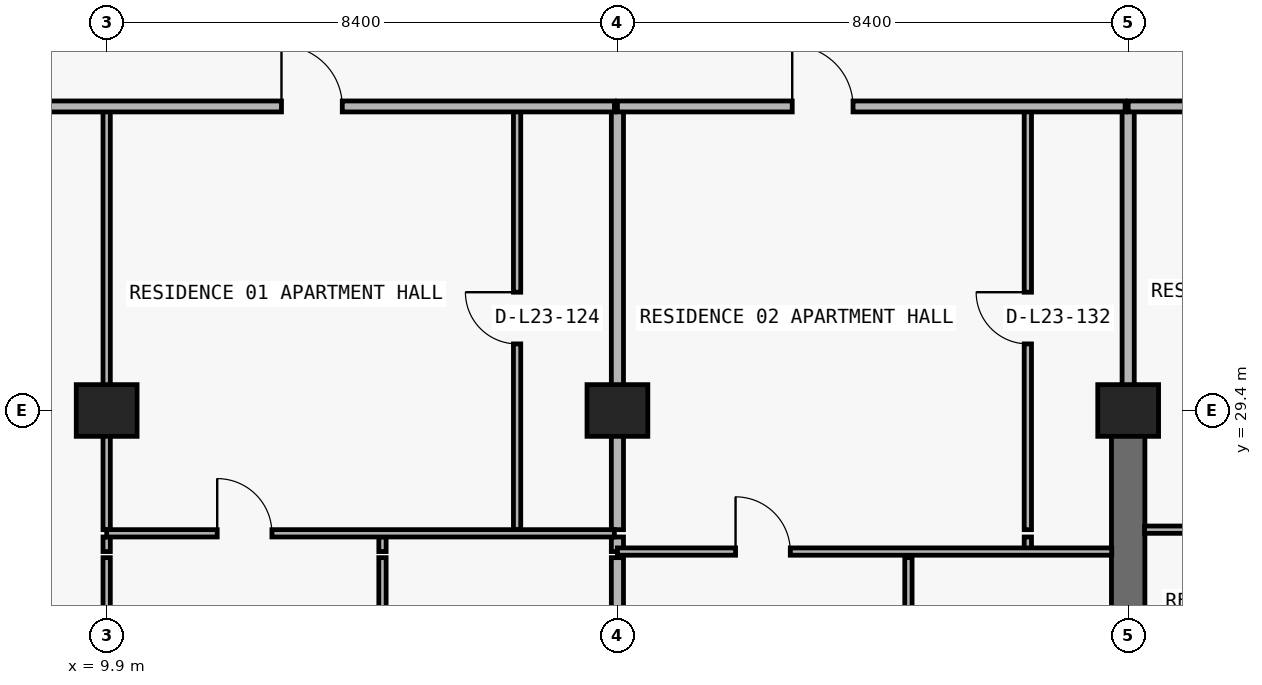
"""IFC4 building model, lengths in metres.
Left out: names, types, materials, properties, quantities, classifications, styles, units other than length and angle.
Written with IfcOpenShell. Run it as: python <this file> out.ifc"""

import sys

from ifc_helpers import new_model, si_unit, direction, frame, frame_2d, origin, origin_2d, place, context, subcontext, project, spatial, rectangle, extrude, element, fill, save


model = new_model("IFC4")
c1 = context("Model", 3, precision=1e-05, world=origin(), true_north=direction((0.0, 1.0)))
c2 = subcontext(c1, "Body", "Model", "MODEL_VIEW")
j1 = project(units=[si_unit("LENGTHUNIT", "METRE"), si_unit("PLANEANGLEUNIT", "RADIAN")], contexts=[c1])
p1 = place(None, origin())
s1 = spatial("IfcSite", under=j1, at=p1, CompositionType="ELEMENT")
p2 = place(p1, origin())
s2 = spatial("IfcBuilding", under=s1, at=p2, CompositionType="ELEMENT")
p3 = place(p2, frame((0.0, 0.0, 87.9)))
s3 = spatial("IfcBuildingStorey", under=s2, at=p3, CompositionType="ELEMENT", Elevation=87.9)
for number, where, z_axis, x_axis in (
    (1, (9.9, 29.4, 0.0), (0.0, 0.0, 1.0), (1.0, 0.0, 0.0)),
    (2, (18.3, 29.4, 0.0), (0.0, 0.0, 1.0), (1.0, 0.0, 0.0)),
    (3, (26.7, 29.4, 0.0), (0.0, 0.0, 1.0), (1.0, 0.0, 0.0)),
):
    element("IfcColumn", number, at=place(p3, frame(where, z_axis=z_axis, x_axis=x_axis)), inside=s3, PredefinedType="COLUMN", context=c2, shape_type="SweptSolid", body=[
        extrude(rectangle(XDim=1.0, YDim=0.85, at=origin_2d()), origin(), (0.0, 0.0, 1.0), 3.05),
    ])
p4 = place(p3, frame((26.7, 20.8, 0.0), z_axis=(0.0, 0.0, 1.0), x_axis=(0.0, 1.0, 0.0)))
e4 = element("IfcWall", 4, at=p4, inside=s3, PredefinedType="SHEAR", context=c2, shape_type="SweptSolid", body=[
    extrude(rectangle(XDim=8.6, YDim=0.55, at=frame_2d((4.3, 0.0))), origin(), (0.0, 0.0, 1.0), 3.05),
])
p5 = place(p3, frame((9.9, 22.29, 0.0), z_axis=(0.0, 0.0, 1.0), x_axis=(0.0, 1.0, 0.0)))
e5 = element("IfcWall", 5, at=p5, inside=s3, PredefinedType="PARTITIONING", context=c2, shape_type="SweptSolid", body=[
    extrude(rectangle(XDim=4.69, YDim=0.12, at=frame_2d((2.345, 0.0))), origin(), (0.0, 0.0, 1.0), 2.174),
])
p6 = place(p5, frame((1.895, 0.0, 0.0)))
e6 = element("IfcOpeningElement", 6, at=p6, cuts=e5, PredefinedType="OPENING", context=c2, shape_type="SweptSolid", body=[
    extrude(rectangle(XDim=0.9, YDim=2.124, at=frame_2d((0.45, 1.062))), frame((0.0, 0.07, 0.0), z_axis=(0.0, -1.0, 0.0), x_axis=(1.0, 0.0, 0.0)), (0.0, 0.0, 1.0), 0.14),
])
p7 = place(p3, frame((9.9, 27.08, 0.0), z_axis=(0.0, 0.0, 1.0), x_axis=(0.0, 1.0, 0.0)))
e7 = element("IfcWall", 7, at=p7, inside=s3, PredefinedType="PARTITIONING", context=c2, shape_type="SweptSolid", body=[
    extrude(rectangle(XDim=0.24, YDim=0.12, at=frame_2d((0.12, 0.0))), origin(), (0.0, 0.0, 1.0), 2.174),
])
p8 = place(p3, frame((9.9, 27.44, 0.0), z_axis=(0.0, 0.0, 1.0), x_axis=(0.0, 1.0, 0.0)))
e8 = element("IfcWall", 8, at=p8, inside=s3, PredefinedType="PARTITIONING", context=c2, shape_type="SweptSolid", body=[
    extrude(rectangle(XDim=6.96, YDim=0.12, at=frame_2d((3.48, 0.0))), origin(), (0.0, 0.0, 1.0), 2.174),
])
p9 = place(p3, frame((14.436, 22.29, 0.0), z_axis=(0.0, 0.0, 1.0), x_axis=(0.0, 1.0, 0.0)))
e9 = element("IfcWall", 9, at=p9, inside=s3, PredefinedType="PARTITIONING", context=c2, shape_type="SweptSolid", body=[
    extrude(rectangle(XDim=4.69, YDim=0.12, at=frame_2d((2.345, 0.0))), origin(), (0.0, 0.0, 1.0), 3.05),
])
p10 = place(p9, frame((1.895, 0.0, 0.0)))
e10 = element("IfcOpeningElement", 10, at=p10, cuts=e9, PredefinedType="OPENING", context=c2, shape_type="SweptSolid", body=[
    extrude(rectangle(XDim=0.9, YDim=2.15, at=frame_2d((0.45, 1.075))), frame((0.0, 0.07, 0.0), z_axis=(0.0, -1.0, 0.0), x_axis=(1.0, 0.0, 0.0)), (0.0, 0.0, 1.0), 0.14),
])
p11 = place(p3, frame((14.436, 27.08, 0.0), z_axis=(0.0, 0.0, 1.0), x_axis=(0.0, 1.0, 0.0)))
e11 = element("IfcWall", 11, at=p11, inside=s3, PredefinedType="PARTITIONING", context=c2, shape_type="SweptSolid", body=[
    extrude(rectangle(XDim=0.24, YDim=0.12, at=frame_2d((0.12, 0.0))), origin(), (0.0, 0.0, 1.0), 3.05),
])
p12 = place(p3, frame((16.65, 27.44, 0.0), z_axis=(0.0, 0.0, 1.0), x_axis=(0.0, 1.0, 0.0)))
e12 = element("IfcWall", 12, at=p12, inside=s3, PredefinedType="PARTITIONING", context=c2, shape_type="SweptSolid", body=[
    extrude(rectangle(XDim=6.96, YDim=0.12, at=frame_2d((3.48, 0.0))), origin(), (0.0, 0.0, 1.0), 3.05),
])
p13 = place(p12, frame((3.055, 0.0, 0.0)))
e13 = element("IfcOpeningElement", 13, at=p13, cuts=e12, PredefinedType="OPENING", context=c2, shape_type="SweptSolid", body=[
    extrude(rectangle(XDim=0.85, YDim=2.1, at=frame_2d((0.425, 1.05))), frame((0.0, 0.07, 0.0), z_axis=(0.0, -1.0, 0.0), x_axis=(1.0, 0.0, 0.0)), (0.0, 0.0, 1.0), 0.14),
])
p14 = place(p3, frame((18.3, 22.29, 0.0), z_axis=(0.0, 0.0, 1.0), x_axis=(0.0, 1.0, 0.0)))
e14 = element("IfcWall", 14, at=p14, inside=s3, PredefinedType="PARTITIONING", context=c2, shape_type="SweptSolid", body=[
    extrude(rectangle(XDim=4.69, YDim=0.2, at=frame_2d((2.345, 0.0))), origin(), (0.0, 0.0, 1.0), 2.174),
])
p15 = place(p3, frame((18.3, 27.08, 0.0), z_axis=(0.0, 0.0, 1.0), x_axis=(0.0, 1.0, 0.0)))
e15 = element("IfcWall", 15, at=p15, inside=s3, PredefinedType="PARTITIONING", context=c2, shape_type="SweptSolid", body=[
    extrude(rectangle(XDim=0.24, YDim=0.2, at=frame_2d((0.12, 0.0))), origin(), (0.0, 0.0, 1.0), 2.174),
])
p16 = place(p3, frame((18.3, 27.44, 0.0), z_axis=(0.0, 0.0, 1.0), x_axis=(0.0, 1.0, 0.0)))
e16 = element("IfcWall", 16, at=p16, inside=s3, PredefinedType="PARTITIONING", context=c2, shape_type="SweptSolid", body=[
    extrude(rectangle(XDim=6.96, YDim=0.2, at=frame_2d((3.48, 0.0))), origin(), (0.0, 0.0, 1.0), 2.174),
])
p17 = place(p3, frame((23.086, 22.29, 0.0), z_axis=(0.0, 0.0, 1.0), x_axis=(0.0, 1.0, 0.0)))
e17 = element("IfcWall", 17, at=p17, inside=s3, PredefinedType="PARTITIONING", context=c2, shape_type="SweptSolid", body=[
    extrude(rectangle(XDim=4.69, YDim=0.12, at=frame_2d((2.345, 0.0))), origin(), (0.0, 0.0, 1.0), 3.05),
])
p18 = place(p17, frame((1.895, 0.0, 0.0)))
e18 = element("IfcOpeningElement", 18, at=p18, cuts=e17, PredefinedType="OPENING", context=c2, shape_type="SweptSolid", body=[
    extrude(rectangle(XDim=0.9, YDim=2.15, at=frame_2d((0.45, 1.075))), frame((0.0, 0.07, 0.0), z_axis=(0.0, -1.0, 0.0), x_axis=(1.0, 0.0, 0.0)), (0.0, 0.0, 1.0), 0.14),
])
p19 = place(p3, frame((25.05, 27.08, 0.0), z_axis=(0.0, 0.0, 1.0), x_axis=(0.0, 1.0, 0.0)))
e19 = element("IfcWall", 19, at=p19, inside=s3, PredefinedType="PARTITIONING", context=c2, shape_type="SweptSolid", body=[
    extrude(rectangle(XDim=0.24, YDim=0.12, at=frame_2d((0.12, 0.0))), origin(), (0.0, 0.0, 1.0), 3.05),
])
p20 = place(p3, frame((25.05, 27.44, 0.0), z_axis=(0.0, 0.0, 1.0), x_axis=(0.0, 1.0, 0.0)))
e20 = element("IfcWall", 20, at=p20, inside=s3, PredefinedType="PARTITIONING", context=c2, shape_type="SweptSolid", body=[
    extrude(rectangle(XDim=6.96, YDim=0.12, at=frame_2d((3.48, 0.0))), origin(), (0.0, 0.0, 1.0), 3.05),
])
p21 = place(p20, frame((3.055, 0.0, 0.0)))
e21 = element("IfcOpeningElement", 21, at=p21, cuts=e20, PredefinedType="OPENING", context=c2, shape_type="SweptSolid", body=[
    extrude(rectangle(XDim=0.85, YDim=2.1, at=frame_2d((0.425, 1.05))), frame((0.0, 0.07, 0.0), z_axis=(0.0, -1.0, 0.0), x_axis=(1.0, 0.0, 0.0)), (0.0, 0.0, 1.0), 0.14),
])
p22 = place(p3, frame((26.7, 29.405, 0.0), z_axis=(0.0, 0.0, 1.0), x_axis=(0.0, 1.0, 0.0)))
e22 = element("IfcWall", 22, at=p22, inside=s3, PredefinedType="PARTITIONING", context=c2, shape_type="SweptSolid", body=[
    extrude(rectangle(XDim=4.995, YDim=0.2, at=frame_2d((2.498, 0.0))), origin(), (0.0, 0.0, 1.0), 2.335),
])
p23 = place(p3, frame((18.3, 27.08, 0.0), z_axis=(0.0, 0.0, 1.0), x_axis=(1.0, 0.0, 0.0)))
e23 = element("IfcWall", 23, at=p23, inside=s3, PredefinedType="PARTITIONING", context=c2, shape_type="SweptSolid", body=[
    extrude(rectangle(XDim=8.13, YDim=0.12, at=frame_2d((4.065, 0.0))), origin(), (0.0, 0.0, 1.0), 3.05),
])
p24 = place(p23, frame((1.943, 0.0, 0.0)))
e24 = element("IfcOpeningElement", 24, at=p24, cuts=e23, PredefinedType="OPENING", context=c2, shape_type="SweptSolid", body=[
    extrude(rectangle(XDim=0.9, YDim=2.15, at=frame_2d((0.45, 1.075))), frame((0.0, 0.07, 0.0), z_axis=(0.0, -1.0, 0.0), x_axis=(1.0, 0.0, 0.0)), (0.0, 0.0, 1.0), 0.14),
])
p25 = place(p3, frame((9.9, 27.38, 0.0), z_axis=(0.0, 0.0, 1.0), x_axis=(1.0, 0.0, 0.0)))
e25 = element("IfcWall", 25, at=p25, inside=s3, PredefinedType="PARTITIONING", context=c2, shape_type="SweptSolid", body=[
    extrude(rectangle(XDim=8.35, YDim=0.12, at=frame_2d((4.175, 0.0))), origin(), (0.0, 0.0, 1.0), 3.05),
])
p26 = place(p25, frame((1.818, 0.0, 0.0)))
e26 = element("IfcOpeningElement", 26, at=p26, cuts=e25, PredefinedType="OPENING", context=c2, shape_type="SweptSolid", body=[
    extrude(rectangle(XDim=0.9, YDim=2.15, at=frame_2d((0.45, 1.075))), frame((0.0, 0.07, 0.0), z_axis=(0.0, -1.0, 0.0), x_axis=(1.0, 0.0, 0.0)), (0.0, 0.0, 1.0), 0.14),
])
p27 = place(p3, frame((26.97, 27.44, 0.0), z_axis=(0.0, 0.0, 1.0), x_axis=(1.0, 0.0, 0.0)))
e27 = element("IfcWall", 27, at=p27, inside=s3, PredefinedType="PARTITIONING", context=c2, shape_type="SweptSolid", body=[
    extrude(rectangle(XDim=8.13, YDim=0.12, at=frame_2d((4.065, 0.0))), origin(), (0.0, 0.0, 1.0), 3.05),
])
p28 = place(p27, frame((1.558, 0.0, 0.0)))
e28 = element("IfcOpeningElement", 28, at=p28, cuts=e27, PredefinedType="OPENING", context=c2, shape_type="SweptSolid", body=[
    extrude(rectangle(XDim=0.9, YDim=2.15, at=frame_2d((0.45, 1.075))), frame((0.0, 0.07, 0.0), z_axis=(0.0, -1.0, 0.0), x_axis=(1.0, 0.0, 0.0)), (0.0, 0.0, 1.0), 0.14),
])
p29 = place(p3, frame((7.705, 34.4, 0.0), z_axis=(0.0, 0.0, 1.0), x_axis=(1.0, 0.0, 0.0)))
e29 = element("IfcWall", 29, at=p29, inside=s3, PredefinedType="PARTITIONING", context=c2, shape_type="SweptSolid", body=[
    extrude(rectangle(XDim=10.545, YDim=0.18, at=frame_2d((5.272, 0.0))), origin(), (0.0, 0.0, 1.0), 3.05),
])
p30 = place(p29, frame((5.07, 0.0, 0.0)))
e30 = element("IfcOpeningElement", 30, at=p30, cuts=e29, PredefinedType="OPENING", context=c2, shape_type="SweptSolid", body=[
    extrude(rectangle(XDim=1.0, YDim=2.2, at=frame_2d((0.5, 1.1))), frame((0.0, 0.1, 0.0), z_axis=(0.0, -1.0, 0.0), x_axis=(1.0, 0.0, 0.0)), (0.0, 0.0, 1.0), 0.2),
])
p31 = place(p3, frame((18.3, 34.4, 0.0), z_axis=(0.0, 0.0, 1.0), x_axis=(1.0, 0.0, 0.0)))
e31 = element("IfcWall", 31, at=p31, inside=s3, PredefinedType="PARTITIONING", context=c2, shape_type="SweptSolid", body=[
    extrude(rectangle(XDim=8.35, YDim=0.18, at=frame_2d((4.175, 0.0))), origin(), (0.0, 0.0, 1.0), 3.05),
])
p32 = place(p31, frame((2.875, 0.0, 0.0)))
e32 = element("IfcOpeningElement", 32, at=p32, cuts=e31, PredefinedType="OPENING", context=c2, shape_type="SweptSolid", body=[
    extrude(rectangle(XDim=1.0, YDim=2.2, at=frame_2d((0.5, 1.1))), frame((0.0, 0.1, 0.0), z_axis=(0.0, -1.0, 0.0), x_axis=(1.0, 0.0, 0.0)), (0.0, 0.0, 1.0), 0.2),
])
p33 = place(p3, frame((26.7, 34.4, 0.0), z_axis=(0.0, 0.0, 1.0), x_axis=(1.0, 0.0, 0.0)))
e33 = element("IfcWall", 33, at=p33, inside=s3, PredefinedType="PARTITIONING", context=c2, shape_type="SweptSolid", body=[
    extrude(rectangle(XDim=29.186, YDim=0.18, at=frame_2d((14.593, 0.0))), origin(), (0.0, 0.0, 1.0), 3.05),
])
p34 = place(p33, frame((2.875, 0.0, 0.0)))
e34 = element("IfcOpeningElement", 34, at=p34, cuts=e33, PredefinedType="OPENING", context=c2, shape_type="SweptSolid", body=[
    extrude(rectangle(XDim=1.0, YDim=2.2, at=frame_2d((0.5, 1.1))), frame((0.0, 0.1, 0.0), z_axis=(0.0, -1.0, 0.0), x_axis=(1.0, 0.0, 0.0)), (0.0, 0.0, 1.0), 0.2),
])
p35 = place(p33, frame((10.95, 0.0, 0.0)))
e35 = element("IfcOpeningElement", 35, at=p35, cuts=e33, PredefinedType="OPENING", context=c2, shape_type="SweptSolid", body=[
    extrude(rectangle(XDim=1.0, YDim=2.2, at=frame_2d((0.5, 1.1))), frame((0.0, 0.1, 0.0), z_axis=(0.0, -1.0, 0.0), x_axis=(1.0, 0.0, 0.0)), (0.0, 0.0, 1.0), 0.2),
])
p36 = place(p33, frame((26.293, 0.0, 0.0)))
e36 = element("IfcOpeningElement", 36, at=p36, cuts=e33, PredefinedType="OPENING", context=c2, shape_type="SweptSolid", body=[
    extrude(rectangle(XDim=1.0, YDim=2.2, at=frame_2d((0.5, 1.1))), frame((0.0, 0.1, 0.0), z_axis=(0.0, -1.0, 0.0), x_axis=(1.0, 0.0, 0.0)), (0.0, 0.0, 1.0), 0.2),
])
p37 = place(p30, origin())
e37 = element("IfcDoor", 37, at=p37, inside=s3, OperationType="SINGLE_SWING_LEFT", PredefinedType="DOOR", context=c2, shape_type="SweptSolid", body=[
    extrude(rectangle(XDim=1.0, YDim=2.2, at=frame_2d((0.5, 1.1))), frame((0.0, 0.025, 0.0), z_axis=(0.0, -1.0, 0.0), x_axis=(1.0, 0.0, 0.0)), (0.0, 0.0, 1.0), 0.05),
])
fill(e30, e37)
p38 = place(p13, origin())
e38 = element("IfcDoor", 38, at=p38, inside=s3, OperationType="SINGLE_SWING_RIGHT", PredefinedType="DOOR", context=c2, shape_type="SweptSolid", body=[
    extrude(rectangle(XDim=0.85, YDim=2.1, at=frame_2d((0.425, 1.05))), frame((0.0, 0.025, 0.0), z_axis=(0.0, -1.0, 0.0), x_axis=(1.0, 0.0, 0.0)), (0.0, 0.0, 1.0), 0.05),
])
fill(e13, e38)
p39 = place(p26, origin())
e39 = element("IfcDoor", 39, at=p39, inside=s3, OperationType="SINGLE_SWING_LEFT", PredefinedType="DOOR", context=c2, shape_type="SweptSolid", body=[
    extrude(rectangle(XDim=0.9, YDim=2.15, at=frame_2d((0.45, 1.075))), frame((0.0, 0.025, 0.0), z_axis=(0.0, -1.0, 0.0), x_axis=(1.0, 0.0, 0.0)), (0.0, 0.0, 1.0), 0.05),
])
fill(e26, e39)
p40 = place(p32, origin())
e40 = element("IfcDoor", 40, at=p40, inside=s3, OperationType="SINGLE_SWING_LEFT", PredefinedType="DOOR", context=c2, shape_type="SweptSolid", body=[
    extrude(rectangle(XDim=1.0, YDim=2.2, at=frame_2d((0.5, 1.1))), frame((0.0, 0.025, 0.0), z_axis=(0.0, -1.0, 0.0), x_axis=(1.0, 0.0, 0.0)), (0.0, 0.0, 1.0), 0.05),
])
fill(e32, e40)
p41 = place(p21, origin())
e41 = element("IfcDoor", 41, at=p41, inside=s3, OperationType="SINGLE_SWING_RIGHT", PredefinedType="DOOR", context=c2, shape_type="SweptSolid", body=[
    extrude(rectangle(XDim=0.85, YDim=2.1, at=frame_2d((0.425, 1.05))), frame((0.0, 0.025, 0.0), z_axis=(0.0, -1.0, 0.0), x_axis=(1.0, 0.0, 0.0)), (0.0, 0.0, 1.0), 0.05),
])
fill(e21, e41)
p42 = place(p24, origin())
e42 = element("IfcDoor", 42, at=p42, inside=s3, OperationType="SINGLE_SWING_LEFT", PredefinedType="DOOR", context=c2, shape_type="SweptSolid", body=[
    extrude(rectangle(XDim=0.9, YDim=2.15, at=frame_2d((0.45, 1.075))), frame((0.0, 0.025, 0.0), z_axis=(0.0, -1.0, 0.0), x_axis=(1.0, 0.0, 0.0)), (0.0, 0.0, 1.0), 0.05),
])
fill(e24, e42)
save(model, sys.argv[1])
